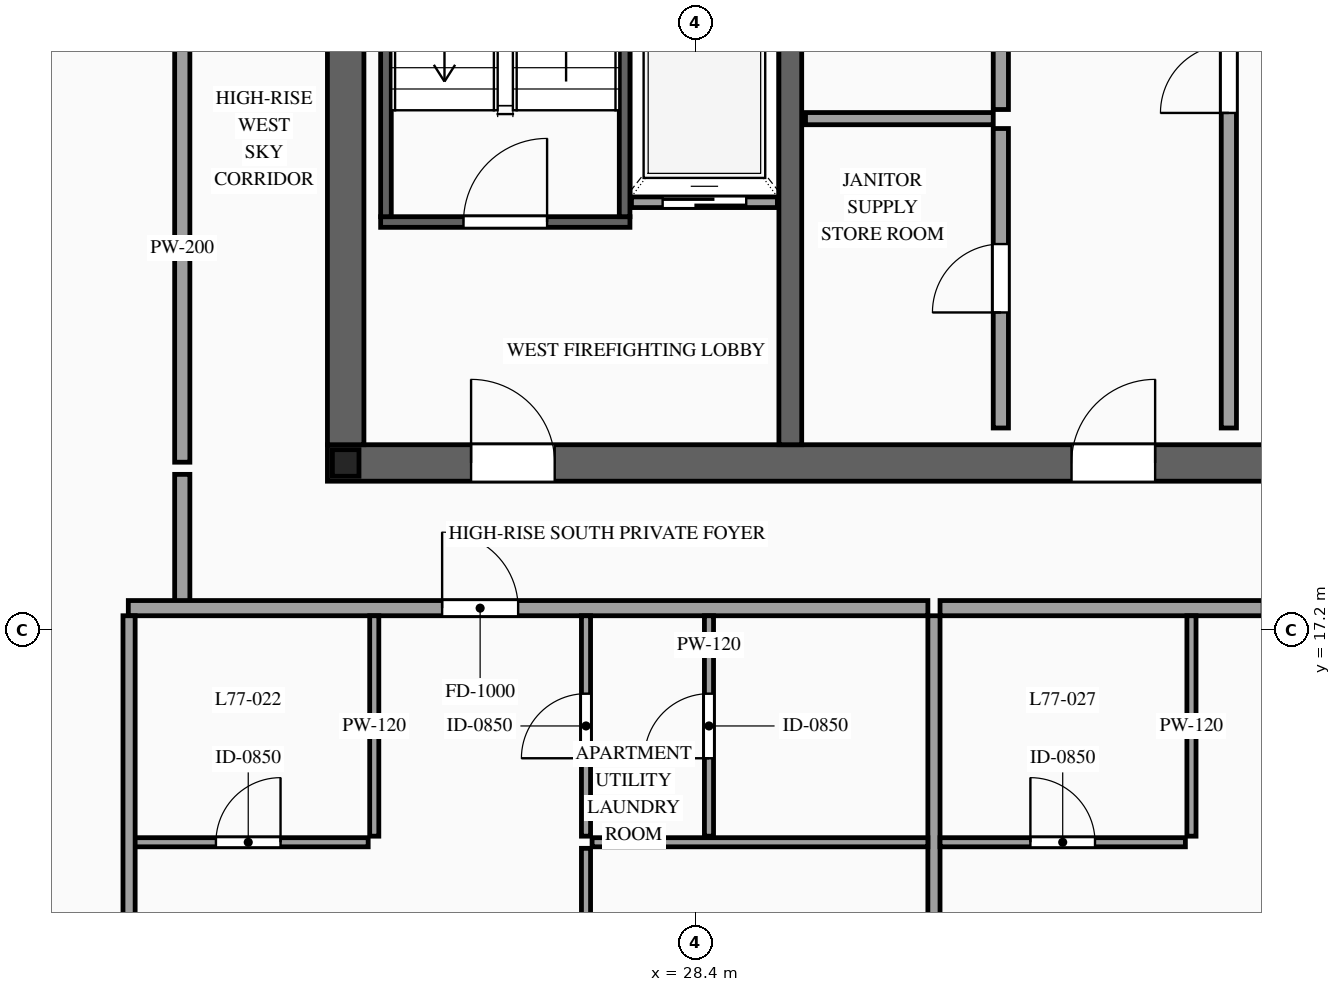
"""IFC4 building model, lengths in metres.
Left out: names, types, materials, properties, quantities, classifications, styles, units other than length and angle.
Written with IfcOpenShell. Run it as: python <this file> out.ifc"""

import sys

from ifc_helpers import new_model, si_unit, direction, frame, frame_2d, origin, origin_2d, place, context, subcontext, project, spatial, rectangle, i_section, extrude, source, transform, mapped, element, fill, save


model = new_model("IFC4")
c1 = context("Model", 3, precision=1e-05, world=origin(), true_north=direction((0.0, 1.0)))
c2 = subcontext(c1, "Body", "Model", "MODEL_VIEW")
j1 = project(units=[si_unit("LENGTHUNIT", "METRE"), si_unit("PLANEANGLEUNIT", "RADIAN")], contexts=[c1])
p1 = place(None, origin())
s1 = spatial("IfcSite", under=j1, at=p1, CompositionType="ELEMENT")
p2 = place(p1, origin())
s2 = spatial("IfcBuilding", under=s1, at=p2, CompositionType="ELEMENT")
p3 = place(p2, frame((0.0, 0.0, 289.1)))
s3 = spatial("IfcBuildingStorey", under=s2, at=p3, CompositionType="ELEMENT", Elevation=289.1)
p4 = place(p3, frame((23.56, 19.4, 0.0), z_axis=(0.0, 0.0, 1.0), x_axis=(1.0, 0.0, 0.0)))
e1 = element("IfcWall", 1, at=p4, inside=s3, PredefinedType="SHEAR", context=c2, shape_type="SweptSolid", body=[
    extrude(rectangle(XDim=26.88, YDim=0.48, at=frame_2d((13.44, 0.0))), origin(), (0.0, 0.0, 1.0), 3.5),
])
p5 = place(p4, frame((1.89, 0.0, 0.0)))
e2 = element("IfcOpeningElement", 2, at=p5, cuts=e1, PredefinedType="OPENING", context=c2, shape_type="SweptSolid", body=[
    extrude(rectangle(XDim=1.1, YDim=2.2, at=frame_2d((0.55, 1.1))), frame((0.0, 0.255, 0.0), z_axis=(0.0, -1.0, 0.0), x_axis=(1.0, 0.0, 0.0)), (0.0, 0.0, 1.0), 0.51),
])
p6 = place(p4, frame((9.79, 0.0, 0.0)))
e3 = element("IfcOpeningElement", 3, at=p6, cuts=e1, PredefinedType="OPENING", context=c2, shape_type="SweptSolid", body=[
    extrude(rectangle(XDim=1.1, YDim=2.2, at=frame_2d((0.55, 1.1))), frame((0.0, 0.255, 0.0), z_axis=(0.0, -1.0, 0.0), x_axis=(1.0, 0.0, 0.0)), (0.0, 0.0, 1.0), 0.51),
])
p7 = place(p4, frame((22.99, 0.0, 0.0)))
e4 = element("IfcOpeningElement", 4, at=p7, cuts=e1, PredefinedType="OPENING", context=c2, shape_type="SweptSolid", body=[
    extrude(rectangle(XDim=1.1, YDim=2.2, at=frame_2d((0.55, 1.1))), frame((0.0, 0.255, 0.0), z_axis=(0.0, -1.0, 0.0), x_axis=(1.0, 0.0, 0.0)), (0.0, 0.0, 1.0), 0.51),
])
p8 = place(p4, frame((19.61, 0.0, 0.0)))
e5 = element("IfcOpeningElement", 5, at=p8, cuts=e1, PredefinedType="OPENING", context=c2, shape_type="SweptSolid", body=[
    extrude(rectangle(XDim=0.9, YDim=2.15, at=frame_2d((0.45, 1.075))), frame((0.0, 0.255, 0.0), z_axis=(0.0, -1.0, 0.0), x_axis=(1.0, 0.0, 0.0)), (0.0, 0.0, 1.0), 0.51),
])
p9 = place(p4, frame((18.17, 0.0, 0.0)))
e6 = element("IfcOpeningElement", 6, at=p9, cuts=e1, PredefinedType="OPENING", context=c2, shape_type="SweptSolid", body=[
    extrude(rectangle(XDim=0.9, YDim=2.15, at=frame_2d((0.45, 1.075))), frame((0.0, 0.255, 0.0), z_axis=(0.0, -1.0, 0.0), x_axis=(1.0, 0.0, 0.0)), (0.0, 0.0, 1.0), 0.51),
])
m1 = source(origin(), c2, "Body", "SweptSolid", [
    extrude(rectangle(XDim=12.32, YDim=0.48, at=frame_2d((6.16, 0.0))), origin(), (0.0, 0.0, 1.0), 3.5),
])
p10 = place(p3, frame((23.8, 19.64, 0.0), z_axis=(0.0, 0.0, 1.0), x_axis=(0.0, 1.0, 0.0)))
e7 = element("IfcWall", 7, at=p10, inside=s3, PredefinedType="SHEAR", context=c2, shape_type="MappedRepresentation", body=[
    mapped(m1, transform((0.0, 0.0, 0.0), scale=1.0)),
])
m2 = source(origin(), c2, "Body", "SweptSolid", [
    extrude(rectangle(XDim=12.32, YDim=0.3, at=frame_2d((6.16, 0.0))), origin(), (0.0, 0.0, 1.0), 3.5),
])
p11 = place(p3, frame((29.65, 19.64, 0.0), z_axis=(0.0, 0.0, 1.0), x_axis=(0.0, 1.0, 0.0)))
e8 = element("IfcWall", 8, at=p11, inside=s3, PredefinedType="SOLIDWALL", context=c2, shape_type="MappedRepresentation", body=[
    mapped(m2, transform((0.0, 0.0, 0.0), scale=1.0)),
])
m3 = source(origin(), c2, "Body", "SweptSolid", [
    extrude(i_section(OverallWidth=0.35, OverallDepth=0.35, WebThickness=0.012, FlangeThickness=0.019, at=origin_2d()), origin(), (0.0, 0.0, 1.0), 3.5),
])
p12 = place(p3, frame((23.8, 19.4, 0.0), z_axis=(0.0, 0.0, 1.0), x_axis=(1.0, 0.0, 0.0)))
e9 = element("IfcColumn", 9, at=p12, inside=s3, PredefinedType="COLUMN", context=c2, shape_type="MappedRepresentation", body=[
    mapped(m3, transform((0.0, 0.0, 0.0), scale=1.0)),
])
p13 = place(p3, frame((27.56, 22.83, 0.0), z_axis=(0.0, 0.0, 1.0), x_axis=(1.0, 0.0, 0.0)))
e10 = element("IfcWall", 10, at=p13, inside=s3, PredefinedType="SOLIDWALL", context=c2, shape_type="SweptSolid", body=[
    extrude(rectangle(XDim=1.92, YDim=0.14, at=frame_2d((0.96, 0.0))), origin(), (0.0, 0.0, 1.0), 3.28),
])
p14 = place(p13, frame((0.41, 0.0, 0.0)))
e11 = element("IfcOpeningElement", 11, at=p14, cuts=e10, PredefinedType="OPENING", context=c2, shape_type="SweptSolid", body=[
    extrude(rectangle(XDim=1.1, YDim=2.2, at=frame_2d((0.55, 1.1))), frame((0.0, 0.085, 0.0), z_axis=(0.0, -1.0, 0.0), x_axis=(1.0, 0.0, 0.0)), (0.0, 0.0, 1.0), 0.17),
])
p15 = place(p3, frame((24.26, 22.57, 0.0), z_axis=(0.0, 0.0, 1.0), x_axis=(1.0, 0.0, 0.0)))
e12 = element("IfcWall", 12, at=p15, inside=s3, PredefinedType="SOLIDWALL", context=c2, shape_type="SweptSolid", body=[
    extrude(rectangle(XDim=3.28, YDim=0.14, at=frame_2d((1.64, 0.0))), origin(), (0.0, 0.0, 1.0), 3.28),
])
p16 = place(p15, frame((1.09, 0.0, 0.0)))
e13 = element("IfcOpeningElement", 13, at=p16, cuts=e12, PredefinedType="OPENING", context=c2, shape_type="SweptSolid", body=[
    extrude(rectangle(XDim=1.1, YDim=2.2, at=frame_2d((0.55, 1.1))), frame((0.0, 0.085, 0.0), z_axis=(0.0, -1.0, 0.0), x_axis=(1.0, 0.0, 0.0)), (0.0, 0.0, 1.0), 0.17),
])
m4 = source(origin(), c2, "Body", "SweptSolid", [
    extrude(rectangle(XDim=8.94, YDim=0.14, at=frame_2d((4.47, 0.0))), origin(), (0.0, 0.0, 1.0), 3.28),
])
for number, where, z_axis, x_axis in (
    (14, (24.33, 22.64, 0.0), (0.0, 0.0, 1.0), (0.0, 1.0, 0.0)),
    (15, (27.47, 22.64, 0.0), (0.0, 0.0, 1.0), (0.0, 1.0, 0.0)),
):
    element("IfcWall", number, at=place(p3, frame(where, z_axis=z_axis, x_axis=x_axis)), inside=s3, PredefinedType="SOLIDWALL", context=c2, shape_type="MappedRepresentation", body=[
        mapped(m4, transform((0.0, 0.0, 0.0), scale=1.0)),
    ])
p17 = place(p3, frame((32.42, 19.86, 0.0), z_axis=(0.0, 0.0, 1.0), x_axis=(0.0, 1.0, 0.0)))
e16 = element("IfcWall", 16, at=p17, inside=s3, PredefinedType="PARTITIONING", context=c2, shape_type="SweptSolid", body=[
    extrude(rectangle(XDim=3.94, YDim=0.2, at=frame_2d((1.97, 0.0))), origin(), (0.0, 0.0, 1.0), 3.28),
])
p18 = place(p17, frame((1.52, 0.0, 0.0)))
e17 = element("IfcOpeningElement", 17, at=p18, cuts=e16, PredefinedType="OPENING", context=c2, shape_type="SweptSolid", body=[
    extrude(rectangle(XDim=0.9, YDim=2.15, at=frame_2d((0.45, 1.075))), frame((0.0, 0.115, 0.0), z_axis=(0.0, -1.0, 0.0), x_axis=(1.0, 0.0, 0.0)), (0.0, 0.0, 1.0), 0.23),
])
p19 = place(p3, frame((32.42, 24.05, 0.0), z_axis=(0.0, 0.0, 1.0), x_axis=(0.0, 1.0, 0.0)))
e18 = element("IfcWall", 18, at=p19, inside=s3, PredefinedType="PARTITIONING", context=c2, shape_type="SweptSolid", body=[
    extrude(rectangle(XDim=7.69, YDim=0.2, at=frame_2d((3.845, 0.0))), origin(), (0.0, 0.0, 1.0), 3.28),
])
p20 = place(p19, frame((3.395, 0.0, 0.0)))
e19 = element("IfcOpeningElement", 19, at=p20, cuts=e18, PredefinedType="OPENING", context=c2, shape_type="SweptSolid", body=[
    extrude(rectangle(XDim=0.9, YDim=2.15, at=frame_2d((0.45, 1.075))), frame((0.0, 0.115, 0.0), z_axis=(0.0, -1.0, 0.0), x_axis=(1.0, 0.0, 0.0)), (0.0, 0.0, 1.0), 0.23),
])
m5 = source(origin(), c2, "Body", "SweptSolid", [
    extrude(rectangle(XDim=2.47, YDim=0.16, at=frame_2d((1.235, 0.0))), origin(), (0.0, 0.0, 1.0), 3.28),
])
p21 = place(p3, frame((29.85, 23.93, 0.0), z_axis=(0.0, 0.0, 1.0), x_axis=(1.0, 0.0, 0.0)))
e20 = element("IfcWall", 20, at=p21, inside=s3, PredefinedType="PARTITIONING", context=c2, shape_type="MappedRepresentation", body=[
    mapped(m5, transform((0.0, 0.0, 0.0), scale=1.0)),
])
p22 = place(p3, frame((35.42, 19.86, 0.0), z_axis=(0.0, 0.0, 1.0), x_axis=(0.0, 1.0, 0.0)))
e21 = element("IfcWall", 21, at=p22, inside=s3, PredefinedType="PARTITIONING", context=c2, shape_type="SweptSolid", body=[
    extrude(rectangle(XDim=9.19, YDim=0.2, at=frame_2d((4.595, 0.0))), origin(), (0.0, 0.0, 1.0), 3.28),
])
p23 = place(p22, frame((4.145, 0.0, 0.0)))
e22 = element("IfcOpeningElement", 22, at=p23, cuts=e21, PredefinedType="OPENING", context=c2, shape_type="SweptSolid", body=[
    extrude(rectangle(XDim=0.9, YDim=2.15, at=frame_2d((0.45, 1.075))), frame((0.0, 0.115, 0.0), z_axis=(0.0, -1.0, 0.0), x_axis=(1.0, 0.0, 0.0)), (0.0, 0.0, 1.0), 0.23),
])
m6 = source(origin(), c2, "Body", "SweptSolid", [
    extrude(rectangle(XDim=1.7, YDim=0.2, at=frame_2d((0.85, 0.0))), origin(), (0.0, 0.0, 1.0), 3.28),
])
p24 = place(p3, frame((21.65, 17.55, 0.0), z_axis=(0.0, 0.0, 1.0), x_axis=(0.0, 1.0, 0.0)))
e23 = element("IfcWall", 23, at=p24, inside=s3, PredefinedType="PARTITIONING", context=c2, shape_type="MappedRepresentation", body=[
    mapped(m6, transform((0.0, 0.0, 0.0), scale=1.0)),
])
p25 = place(p3, frame((20.94, 17.49, 0.0), z_axis=(0.0, 0.0, 1.0), x_axis=(1.0, 0.0, 0.0)))
e24 = element("IfcWall", 24, at=p25, inside=s3, PredefinedType="PARTITIONING", context=c2, shape_type="SweptSolid", body=[
    extrude(rectangle(XDim=10.52, YDim=0.2, at=frame_2d((5.26, 0.0))), origin(), (0.0, 0.0, 1.0), 3.28),
])
p26 = place(p25, frame((4.129, 0.0, 0.0)))
e25 = element("IfcOpeningElement", 25, at=p26, cuts=e24, PredefinedType="OPENING", context=c2, shape_type="SweptSolid", body=[
    extrude(rectangle(XDim=1.0, YDim=2.2, at=frame_2d((0.5, 1.1))), frame((0.0, 0.115, 0.0), z_axis=(0.0, -1.0, 0.0), x_axis=(1.0, 0.0, 0.0)), (0.0, 0.0, 1.0), 0.23),
])
m7 = source(origin(), c2, "Body", "SweptSolid", [
    extrude(rectangle(XDim=10.54, YDim=0.16, at=frame_2d((5.27, 0.0))), origin(), (0.0, 0.0, 1.0), 3.28),
])
p27 = place(p3, frame((31.54, 6.85, 0.0), z_axis=(0.0, 0.0, 1.0), x_axis=(0.0, 1.0, 0.0)))
e26 = element("IfcWall", 26, at=p27, inside=s3, PredefinedType="PARTITIONING", context=c2, shape_type="MappedRepresentation", body=[
    mapped(m7, transform((0.0, 0.0, 0.0), scale=1.0)),
])
p28 = place(p3, frame((20.94, 14.41, 0.0), z_axis=(0.0, 0.0, 1.0), x_axis=(1.0, 0.0, 0.0)))
e27 = element("IfcWall", 27, at=p28, inside=s3, PredefinedType="PARTITIONING", context=c2, shape_type="SweptSolid", body=[
    extrude(rectangle(XDim=3.156, YDim=0.12, at=frame_2d((1.578, 0.0))), origin(), (0.0, 0.0, 1.0), 3.28),
])
p29 = place(p28, frame((1.153, 0.0, 0.0)))
e28 = element("IfcOpeningElement", 28, at=p29, cuts=e27, PredefinedType="OPENING", context=c2, shape_type="SweptSolid", body=[
    extrude(rectangle(XDim=0.85, YDim=2.1, at=frame_2d((0.425, 1.05))), frame((0.0, 0.075, 0.0), z_axis=(0.0, -1.0, 0.0), x_axis=(1.0, 0.0, 0.0)), (0.0, 0.0, 1.0), 0.15),
])
m8 = source(origin(), c2, "Body", "SweptSolid", [
    extrude(rectangle(XDim=2.9, YDim=0.12, at=frame_2d((1.45, 0.0))), origin(), (0.0, 0.0, 1.0), 3.28),
])
p30 = place(p3, frame((24.176, 14.49, 0.0), z_axis=(0.0, 0.0, 1.0), x_axis=(0.0, 1.0, 0.0)))
e29 = element("IfcWall", 29, at=p30, inside=s3, PredefinedType="PARTITIONING", context=c2, shape_type="MappedRepresentation", body=[
    mapped(m8, transform((0.0, 0.0, 0.0), scale=1.0)),
])
p31 = place(p3, frame((28.58, 14.49, 0.0), z_axis=(0.0, 0.0, 1.0), x_axis=(0.0, 1.0, 0.0)))
e30 = element("IfcWall", 30, at=p31, inside=s3, PredefinedType="PARTITIONING", context=c2, shape_type="SweptSolid", body=[
    extrude(rectangle(XDim=2.9, YDim=0.12, at=frame_2d((1.45, 0.0))), origin(), (0.0, 0.0, 1.0), 3.28),
])
p32 = place(p31, frame((1.025, 0.0, 0.0)))
e31 = element("IfcOpeningElement", 31, at=p32, cuts=e30, PredefinedType="OPENING", context=c2, shape_type="SweptSolid", body=[
    extrude(rectangle(XDim=0.85, YDim=2.1, at=frame_2d((0.425, 1.05))), frame((0.0, 0.075, 0.0), z_axis=(0.0, -1.0, 0.0), x_axis=(1.0, 0.0, 0.0)), (0.0, 0.0, 1.0), 0.15),
])
m9 = source(origin(), c2, "Body", "SweptSolid", [
    extrude(rectangle(XDim=4.418, YDim=0.12, at=frame_2d((2.209, 0.0))), origin(), (0.0, 0.0, 1.0), 3.28),
])
p33 = place(p3, frame((27.042, 14.41, 0.0), z_axis=(0.0, 0.0, 1.0), x_axis=(1.0, 0.0, 0.0)))
e32 = element("IfcWall", 32, at=p33, inside=s3, PredefinedType="PARTITIONING", context=c2, shape_type="MappedRepresentation", body=[
    mapped(m9, transform((0.0, 0.0, 0.0), scale=1.0)),
])
p34 = place(p3, frame((26.962, 6.85, 0.0), z_axis=(0.0, 0.0, 1.0), x_axis=(0.0, 1.0, 0.0)))
e33 = element("IfcWall", 33, at=p34, inside=s3, PredefinedType="PARTITIONING", context=c2, shape_type="SweptSolid", body=[
    extrude(rectangle(XDim=7.48, YDim=0.12, at=frame_2d((3.74, 0.0))), origin(), (0.0, 0.0, 1.0), 3.28),
])
p35 = place(p34, frame((3.29, 0.0, 0.0)))
e34 = element("IfcOpeningElement", 34, at=p35, cuts=e33, PredefinedType="OPENING", context=c2, shape_type="SweptSolid", body=[
    extrude(rectangle(XDim=0.9, YDim=2.15, at=frame_2d((0.45, 1.075))), frame((0.0, 0.075, 0.0), z_axis=(0.0, -1.0, 0.0), x_axis=(1.0, 0.0, 0.0)), (0.0, 0.0, 1.0), 0.15),
])
p36 = place(p3, frame((26.962, 14.49, 0.0), z_axis=(0.0, 0.0, 1.0), x_axis=(0.0, 1.0, 0.0)))
e35 = element("IfcWall", 35, at=p36, inside=s3, PredefinedType="PARTITIONING", context=c2, shape_type="SweptSolid", body=[
    extrude(rectangle(XDim=2.9, YDim=0.12, at=frame_2d((1.45, 0.0))), origin(), (0.0, 0.0, 1.0), 3.28),
])
p37 = place(p36, frame((1.025, 0.0, 0.0)))
e36 = element("IfcOpeningElement", 36, at=p37, cuts=e35, PredefinedType="OPENING", context=c2, shape_type="SweptSolid", body=[
    extrude(rectangle(XDim=0.85, YDim=2.1, at=frame_2d((0.425, 1.05))), frame((0.0, 0.075, 0.0), z_axis=(0.0, -1.0, 0.0), x_axis=(1.0, 0.0, 0.0)), (0.0, 0.0, 1.0), 0.15),
])
p38 = place(p3, frame((31.62, 17.49, 0.0), z_axis=(0.0, 0.0, 1.0), x_axis=(1.0, 0.0, 0.0)))
e37 = element("IfcWall", 37, at=p38, inside=s3, PredefinedType="PARTITIONING", context=c2, shape_type="SweptSolid", body=[
    extrude(rectangle(XDim=10.76, YDim=0.2, at=frame_2d((5.38, 0.0))), origin(), (0.0, 0.0, 1.0), 3.28),
])
p39 = place(p38, frame((4.235, 0.0, 0.0)))
e38 = element("IfcOpeningElement", 38, at=p39, cuts=e37, PredefinedType="OPENING", context=c2, shape_type="SweptSolid", body=[
    extrude(rectangle(XDim=1.0, YDim=2.2, at=frame_2d((0.5, 1.1))), frame((0.0, 0.115, 0.0), z_axis=(0.0, -1.0, 0.0), x_axis=(1.0, 0.0, 0.0)), (0.0, 0.0, 1.0), 0.23),
])
p40 = place(p3, frame((31.62, 14.41, 0.0), z_axis=(0.0, 0.0, 1.0), x_axis=(1.0, 0.0, 0.0)))
e39 = element("IfcWall", 39, at=p40, inside=s3, PredefinedType="PARTITIONING", context=c2, shape_type="SweptSolid", body=[
    extrude(rectangle(XDim=3.228, YDim=0.12, at=frame_2d((1.614, 0.0))), origin(), (0.0, 0.0, 1.0), 3.28),
])
p41 = place(p40, frame((1.189, 0.0, 0.0)))
e40 = element("IfcOpeningElement", 40, at=p41, cuts=e39, PredefinedType="OPENING", context=c2, shape_type="SweptSolid", body=[
    extrude(rectangle(XDim=0.85, YDim=2.1, at=frame_2d((0.425, 1.05))), frame((0.0, 0.075, 0.0), z_axis=(0.0, -1.0, 0.0), x_axis=(1.0, 0.0, 0.0)), (0.0, 0.0, 1.0), 0.15),
])
p42 = place(p3, frame((34.928, 14.49, 0.0), z_axis=(0.0, 0.0, 1.0), x_axis=(0.0, 1.0, 0.0)))
e41 = element("IfcWall", 41, at=p42, inside=s3, PredefinedType="PARTITIONING", context=c2, shape_type="MappedRepresentation", body=[
    mapped(m8, transform((0.0, 0.0, 0.0), scale=1.0)),
])
m10 = source(origin(), c2, "Body", "SweptSolid", [
    extrude(rectangle(XDim=10.39, YDim=0.16, at=frame_2d((5.195, 0.0))), origin(), (0.0, 0.0, 1.0), 3.28),
])
p43 = place(p3, frame((20.95, 7.0, 0.0), z_axis=(0.0, 0.0, 1.0), x_axis=(0.0, 1.0, 0.0)))
e42 = element("IfcWall", 42, at=p43, inside=s3, PredefinedType="PARTITIONING", context=c2, shape_type="MappedRepresentation", body=[
    mapped(m10, transform((0.0, 0.0, 0.0), scale=1.0)),
])
p44 = place(p3, frame((21.65, 19.41, 0.0), z_axis=(0.0, 0.0, 1.0), x_axis=(0.0, 1.0, 0.0)))
e43 = element("IfcWall", 43, at=p44, inside=s3, PredefinedType="PARTITIONING", context=c2, shape_type="SweptSolid", body=[
    extrude(rectangle(XDim=12.78, YDim=0.2, at=frame_2d((6.39, 0.0))), origin(), (0.0, 0.0, 1.0), 3.28),
])
p45 = place(p44, frame((5.89, 0.0, 0.0)))
e44 = element("IfcOpeningElement", 44, at=p45, cuts=e43, PredefinedType="OPENING", context=c2, shape_type="SweptSolid", body=[
    extrude(rectangle(XDim=1.0, YDim=2.2, at=frame_2d((0.5, 1.1))), frame((0.0, 0.115, 0.0), z_axis=(0.0, -1.0, 0.0), x_axis=(1.0, 0.0, 0.0)), (0.0, 0.0, 1.0), 0.23),
])
m11 = source(origin(), c2, "Body", "SweptSolid", [
    extrude(rectangle(XDim=1.1, YDim=2.2, at=frame_2d((0.55, 1.1))), frame((0.0, 0.025, 0.0), z_axis=(0.0, -1.0, 0.0), x_axis=(1.0, 0.0, 0.0)), (0.0, 0.0, 1.0), 0.05),
])
p46 = place(p14, origin())
e45 = element("IfcDoor", 45, at=p46, inside=s3, OperationType="SLIDING_TO_LEFT", PredefinedType="DOOR", context=c2, shape_type="MappedRepresentation", body=[
    mapped(m11, transform((0.0, 0.0, 0.0), scale=1.0)),
])
fill(e11, e45)
m12 = source(origin(), c2, "Body", "SweptSolid", [
    extrude(rectangle(XDim=1.1, YDim=2.2, at=frame_2d((0.55, 1.1))), frame((0.0, 0.025, 0.0), z_axis=(0.0, -1.0, 0.0), x_axis=(1.0, 0.0, 0.0)), (0.0, 0.0, 1.0), 0.05),
])
p47 = place(p16, origin())
e46 = element("IfcDoor", 46, at=p47, inside=s3, OperationType="SINGLE_SWING_RIGHT", PredefinedType="DOOR", context=c2, shape_type="MappedRepresentation", body=[
    mapped(m12, transform((0.0, 0.0, 0.0), scale=1.0)),
])
fill(e13, e46)
p48 = place(p5, origin())
e47 = element("IfcDoor", 47, at=p48, inside=s3, OperationType="SINGLE_SWING_LEFT", PredefinedType="DOOR", context=c2, shape_type="MappedRepresentation", body=[
    mapped(m12, transform((0.0, 0.0, 0.0), scale=1.0)),
])
fill(e2, e47)
p49 = place(p6, origin())
e48 = element("IfcDoor", 48, at=p49, inside=s3, OperationType="SINGLE_SWING_RIGHT", PredefinedType="DOOR", context=c2, shape_type="MappedRepresentation", body=[
    mapped(m12, transform((0.0, 0.0, 0.0), scale=1.0)),
])
fill(e3, e48)
m13 = source(origin(), c2, "Body", "SweptSolid", [
    extrude(rectangle(XDim=0.9, YDim=2.15, at=frame_2d((0.45, 1.075))), frame((0.0, 0.025, 0.0), z_axis=(0.0, -1.0, 0.0), x_axis=(1.0, 0.0, 0.0)), (0.0, 0.0, 1.0), 0.05),
])
p50 = place(p18, origin())
e49 = element("IfcDoor", 49, at=p50, inside=s3, OperationType="SINGLE_SWING_LEFT", PredefinedType="DOOR", context=c2, shape_type="MappedRepresentation", body=[
    mapped(m13, transform((0.0, 0.0, 0.0), scale=1.0)),
])
fill(e17, e49)
p51 = place(p23, origin())
e50 = element("IfcDoor", 50, at=p51, inside=s3, OperationType="SINGLE_SWING_LEFT", PredefinedType="DOOR", context=c2, shape_type="MappedRepresentation", body=[
    mapped(m13, transform((0.0, 0.0, 0.0), scale=1.0)),
])
fill(e22, e50)
m14 = source(origin(), c2, "Body", "SweptSolid", [
    extrude(rectangle(XDim=1.0, YDim=2.2, at=frame_2d((0.5, 1.1))), frame((0.0, 0.025, 0.0), z_axis=(0.0, -1.0, 0.0), x_axis=(1.0, 0.0, 0.0)), (0.0, 0.0, 1.0), 0.05),
])
p52 = place(p26, origin())
e51 = element("IfcDoor", 51, at=p52, inside=s3, OperationType="SINGLE_SWING_LEFT", PredefinedType="DOOR", context=c2, shape_type="MappedRepresentation", body=[
    mapped(m14, transform((0.0, 0.0, 0.0), scale=1.0)),
])
fill(e25, e51)
m15 = source(origin(), c2, "Body", "SweptSolid", [
    extrude(rectangle(XDim=0.85, YDim=2.1, at=frame_2d((0.425, 1.05))), frame((0.0, 0.025, 0.0), z_axis=(0.0, -1.0, 0.0), x_axis=(1.0, 0.0, 0.0)), (0.0, 0.0, 1.0), 0.05),
])
p53 = place(p29, origin())
e52 = element("IfcDoor", 52, at=p53, inside=s3, OperationType="SINGLE_SWING_RIGHT", PredefinedType="DOOR", context=c2, shape_type="MappedRepresentation", body=[
    mapped(m15, transform((0.0, 0.0, 0.0), scale=1.0)),
])
fill(e28, e52)
p54 = place(p32, origin())
e53 = element("IfcDoor", 53, at=p54, inside=s3, OperationType="SINGLE_SWING_LEFT", PredefinedType="DOOR", context=c2, shape_type="MappedRepresentation", body=[
    mapped(m15, transform((0.0, 0.0, 0.0), scale=1.0)),
])
fill(e31, e53)
p55 = place(p37, origin())
e54 = element("IfcDoor", 54, at=p55, inside=s3, OperationType="SINGLE_SWING_LEFT", PredefinedType="DOOR", context=c2, shape_type="MappedRepresentation", body=[
    mapped(m15, transform((0.0, 0.0, 0.0), scale=1.0)),
])
fill(e36, e54)
p56 = place(p41, origin())
e55 = element("IfcDoor", 55, at=p56, inside=s3, OperationType="SINGLE_SWING_LEFT", PredefinedType="DOOR", context=c2, shape_type="MappedRepresentation", body=[
    mapped(m15, transform((0.0, 0.0, 0.0), scale=1.0)),
])
fill(e40, e55)
save(model, sys.argv[1])
